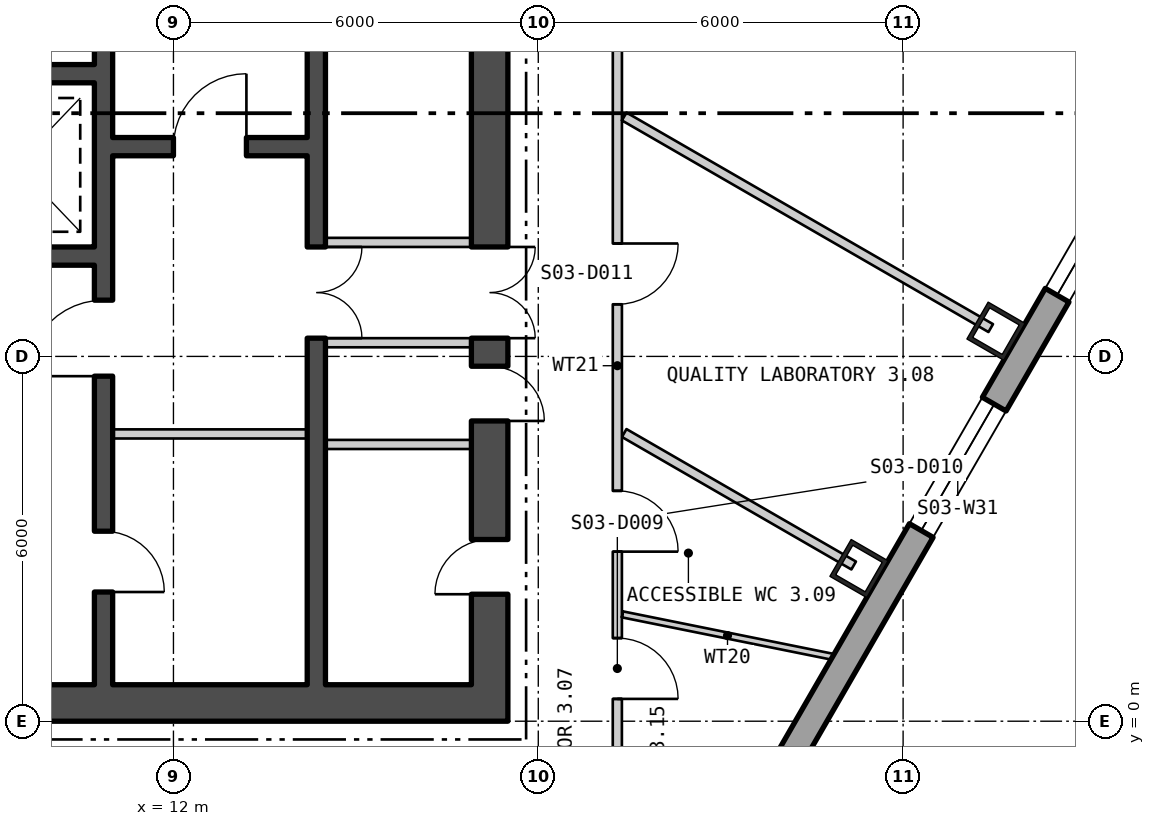
"""IFC4 building model, lengths in metres.
Left out: names, types, materials, properties, quantities, classifications, styles, units other than length and angle.
Written with IfcOpenShell. Run it as: python <this file> out.ifc"""

import sys

from ifc_helpers import new_model, si_unit, direction, frame, frame_2d, origin, origin_2d, place, context, subcontext, project, spatial, polyline, rectangle, hollow_rectangle, outline, extrude, element, fill, save


model = new_model("IFC4")
c1 = context("Model", 3, precision=1e-05, world=origin(), true_north=direction((0.0, 1.0)))
c2 = subcontext(c1, "Body", "Model", "MODEL_VIEW")
j1 = project(units=[si_unit("LENGTHUNIT", "METRE"), si_unit("PLANEANGLEUNIT", "RADIAN")], contexts=[c1])
p1 = place(None, origin())
s1 = spatial("IfcSite", under=j1, at=p1, CompositionType="ELEMENT")
p2 = place(p1, origin())
s2 = spatial("IfcBuilding", under=s1, at=p2, CompositionType="ELEMENT")
p3 = place(p2, frame((0.0, 0.0, 46.8)))
s3 = spatial("IfcBuildingStorey", under=s2, at=p3, CompositionType="ELEMENT", Elevation=46.8)
for number, where, z_axis, x_axis in (
    (1, (23.274, 2.511, 0.0), (0.0, 0.0, 1.0), (0.5, 0.866, 0.0)),
    (2, (25.527, 6.415, 0.0), (0.0, 0.0, 1.0), (0.5, 0.866, 0.0)),
):
    element("IfcColumn", number, at=place(p3, frame(where, z_axis=z_axis, x_axis=x_axis)), inside=s3, PredefinedType="COLUMN", context=c2, shape_type="SweptSolid", body=[
        extrude(hollow_rectangle(XDim=0.7, YDim=0.7, WallThickness=0.07, at=origin_2d()), origin(), (0.0, 0.0, 1.0), 4.5),
    ])
p4 = place(p3, frame((5.575, -29.294, -0.18), z_axis=(0.0, 0.0, 1.0), x_axis=(0.499999764979, 0.866025539474, 0.0)))
e3 = element("IfcWall", 3, at=p4, inside=s3, PredefinedType="SOLIDWALL", context=c2, shape_type="SweptSolid", body=[
    extrude(outline(polyline([(-0.13, -0.225), (45.87, -0.225), (45.61, 0.225), (0.13, 0.225), (-0.13, -0.225)])), origin(), (0.0, 0.0, 1.0), 4.28),
])
p5 = place(p4, frame((1.424, 0.0, 1.08)))
e4 = element("IfcOpeningElement", 4, at=p5, cuts=e3, PredefinedType="OPENING", context=c2, shape_type="SweptSolid", body=[
    extrude(rectangle(XDim=2.4, YDim=2.6, at=frame_2d((1.2, 1.3))), frame((0.0, 0.235, 0.0), z_axis=(0.0, -1.0, 0.0), x_axis=(1.0, 0.0, 0.0)), (0.0, 0.0, 1.0), 0.47),
])
p6 = place(p4, frame((5.893, 0.0, 1.08)))
e5 = element("IfcOpeningElement", 5, at=p6, cuts=e3, PredefinedType="OPENING", context=c2, shape_type="SweptSolid", body=[
    extrude(rectangle(XDim=2.4, YDim=2.6, at=frame_2d((1.2, 1.3))), frame((0.0, 0.235, 0.0), z_axis=(0.0, -1.0, 0.0), x_axis=(1.0, 0.0, 0.0)), (0.0, 0.0, 1.0), 0.47),
])
p7 = place(p4, frame((10.401, 0.0, 1.08)))
e6 = element("IfcOpeningElement", 6, at=p7, cuts=e3, PredefinedType="OPENING", context=c2, shape_type="SweptSolid", body=[
    extrude(rectangle(XDim=2.4, YDim=2.6, at=frame_2d((1.2, 1.3))), frame((0.0, 0.235, 0.0), z_axis=(0.0, -1.0, 0.0), x_axis=(1.0, 0.0, 0.0)), (0.0, 0.0, 1.0), 0.47),
])
p8 = place(p4, frame((14.909, 0.0, 1.08)))
e7 = element("IfcOpeningElement", 7, at=p8, cuts=e3, PredefinedType="OPENING", context=c2, shape_type="SweptSolid", body=[
    extrude(rectangle(XDim=2.4, YDim=2.6, at=frame_2d((1.2, 1.3))), frame((0.0, 0.235, 0.0), z_axis=(0.0, -1.0, 0.0), x_axis=(1.0, 0.0, 0.0)), (0.0, 0.0, 1.0), 0.47),
])
p9 = place(p4, frame((19.416, 0.0, 1.08)))
e8 = element("IfcOpeningElement", 8, at=p9, cuts=e3, PredefinedType="OPENING", context=c2, shape_type="SweptSolid", body=[
    extrude(rectangle(XDim=2.4, YDim=2.6, at=frame_2d((1.2, 1.3))), frame((0.0, 0.235, 0.0), z_axis=(0.0, -1.0, 0.0), x_axis=(1.0, 0.0, 0.0)), (0.0, 0.0, 1.0), 0.47),
])
p10 = place(p4, frame((23.924, 0.0, 1.08)))
e9 = element("IfcOpeningElement", 9, at=p10, cuts=e3, PredefinedType="OPENING", context=c2, shape_type="SweptSolid", body=[
    extrude(rectangle(XDim=2.4, YDim=2.6, at=frame_2d((1.2, 1.3))), frame((0.0, 0.235, 0.0), z_axis=(0.0, -1.0, 0.0), x_axis=(1.0, 0.0, 0.0)), (0.0, 0.0, 1.0), 0.47),
])
p11 = place(p4, frame((37.447, 0.0, 1.08)))
e10 = element("IfcOpeningElement", 10, at=p11, cuts=e3, PredefinedType="OPENING", context=c2, shape_type="SweptSolid", body=[
    extrude(rectangle(XDim=2.4, YDim=2.6, at=frame_2d((1.2, 1.3))), frame((0.0, 0.235, 0.0), z_axis=(0.0, -1.0, 0.0), x_axis=(1.0, 0.0, 0.0)), (0.0, 0.0, 1.0), 0.47),
])
p12 = place(p4, frame((41.916, 0.0, 1.08)))
e11 = element("IfcOpeningElement", 11, at=p12, cuts=e3, PredefinedType="OPENING", context=c2, shape_type="SweptSolid", body=[
    extrude(rectangle(XDim=2.4, YDim=2.6, at=frame_2d((1.2, 1.3))), frame((0.0, 0.235, 0.0), z_axis=(0.0, -1.0, 0.0), x_axis=(1.0, 0.0, 0.0)), (0.0, 0.0, 1.0), 0.47),
])
p13 = place(p3, frame((28.445, 10.319, -0.4), z_axis=(0.0, 0.0, 1.0), x_axis=(-0.500002192499, 0.866024137941, 0.0)))
e12 = element("IfcWall", 12, at=p13, inside=s3, PredefinedType="SOLIDWALL", context=c2, shape_type="SweptSolid", body=[
    extrude(outline(polyline([(-0.13, -0.225), (11.28, -0.225), (11.02, 0.225), (0.13, 0.225), (-0.13, -0.225)])), origin(), (0.0, 0.0, 1.0), 4.5),
])
p14 = place(p13, frame((1.218, 0.0, 1.3)))
e13 = element("IfcOpeningElement", 13, at=p14, cuts=e12, PredefinedType="OPENING", context=c2, shape_type="SweptSolid", body=[
    extrude(rectangle(XDim=1.8, YDim=2.6, at=frame_2d((0.9, 1.3))), frame((0.0, 0.235, 0.0), z_axis=(0.0, -1.0, 0.0), x_axis=(1.0, 0.0, 0.0)), (0.0, 0.0, 1.0), 0.47),
])
p15 = place(p13, frame((4.675, 0.0, 1.3)))
e14 = element("IfcOpeningElement", 14, at=p15, cuts=e12, PredefinedType="OPENING", context=c2, shape_type="SweptSolid", body=[
    extrude(rectangle(XDim=1.8, YDim=2.6, at=frame_2d((0.9, 1.3))), frame((0.0, 0.235, 0.0), z_axis=(0.0, -1.0, 0.0), x_axis=(1.0, 0.0, 0.0)), (0.0, 0.0, 1.0), 0.47),
])
p16 = place(p13, frame((8.132, 0.0, 1.3)))
e15 = element("IfcOpeningElement", 15, at=p16, cuts=e12, PredefinedType="OPENING", context=c2, shape_type="SweptSolid", body=[
    extrude(rectangle(XDim=1.8, YDim=2.6, at=frame_2d((0.9, 1.3))), frame((0.0, 0.235, 0.0), z_axis=(0.0, -1.0, 0.0), x_axis=(1.0, 0.0, 0.0)), (0.0, 0.0, 1.0), 0.47),
])
p17 = place(p3, frame((-17.5, 0.3, 0.0), z_axis=(0.0, 0.0, 1.0), x_axis=(1.0, 0.0, 0.0)))
e16 = element("IfcWall", 16, at=p17, inside=s3, PredefinedType="SHEAR", context=c2, shape_type="SweptSolid", body=[
    extrude(rectangle(XDim=35.0, YDim=0.6, at=frame_2d((17.5, 0.0))), origin(), (0.0, 0.0, 1.0), 4.3),
])
p18 = place(p17, frame((12.0, 0.0, 0.0)))
e17 = element("IfcOpeningElement", 17, at=p18, cuts=e16, PredefinedType="OPENING", context=c2, shape_type="SweptSolid", body=[
    extrude(rectangle(XDim=1.8, YDim=2.4, at=frame_2d((0.9, 1.2))), frame((0.0, 0.31, 0.0), z_axis=(0.0, -1.0, 0.0), x_axis=(1.0, 0.0, 0.0)), (0.0, 0.0, 1.0), 0.62),
])
p19 = place(p17, frame((22.0, 0.0, 0.0)))
e18 = element("IfcOpeningElement", 18, at=p19, cuts=e16, PredefinedType="OPENING", context=c2, shape_type="SweptSolid", body=[
    extrude(rectangle(XDim=1.8, YDim=2.4, at=frame_2d((0.9, 1.2))), frame((0.0, 0.31, 0.0), z_axis=(0.0, -1.0, 0.0), x_axis=(1.0, 0.0, 0.0)), (0.0, 0.0, 1.0), 0.62),
])
p20 = place(p3, frame((17.2, 0.6, 0.0), z_axis=(0.0, 0.0, 1.0), x_axis=(0.0, 1.0, 0.0)))
e19 = element("IfcWall", 19, at=p20, inside=s3, PredefinedType="SHEAR", context=c2, shape_type="SweptSolid", body=[
    extrude(rectangle(XDim=16.8, YDim=0.6, at=frame_2d((8.4, 0.0))), origin(), (0.0, 0.0, 1.0), 4.3),
])
p21 = place(p20, frame((5.7, 0.0, 0.0)))
e20 = element("IfcOpeningElement", 20, at=p21, cuts=e19, PredefinedType="OPENING", context=c2, shape_type="SweptSolid", body=[
    extrude(rectangle(XDim=1.5, YDim=2.1, at=frame_2d((0.75, 1.05))), frame((0.0, 0.31, 0.0), z_axis=(0.0, -1.0, 0.0), x_axis=(1.0, 0.0, 0.0)), (0.0, 0.0, 1.0), 0.62),
])
p22 = place(p20, frame((1.488, 0.0, 0.0)))
e21 = element("IfcOpeningElement", 21, at=p22, cuts=e19, PredefinedType="OPENING", context=c2, shape_type="SweptSolid", body=[
    extrude(rectangle(XDim=0.9, YDim=2.1, at=frame_2d((0.45, 1.05))), frame((0.0, 0.31, 0.0), z_axis=(0.0, -1.0, 0.0), x_axis=(1.0, 0.0, 0.0)), (0.0, 0.0, 1.0), 0.62),
])
p23 = place(p20, frame((4.338, 0.0, 0.0)))
e22 = element("IfcOpeningElement", 22, at=p23, cuts=e19, PredefinedType="OPENING", context=c2, shape_type="SweptSolid", body=[
    extrude(rectangle(XDim=0.9, YDim=2.1, at=frame_2d((0.45, 1.05))), frame((0.0, 0.31, 0.0), z_axis=(0.0, -1.0, 0.0), x_axis=(1.0, 0.0, 0.0)), (0.0, 0.0, 1.0), 0.62),
])
p24 = place(p20, frame((10.483, 0.0, 0.0)))
e23 = element("IfcOpeningElement", 23, at=p24, cuts=e19, PredefinedType="OPENING", context=c2, shape_type="SweptSolid", body=[
    extrude(rectangle(XDim=0.9, YDim=2.1, at=frame_2d((0.45, 1.05))), frame((0.0, 0.31, 0.0), z_axis=(0.0, -1.0, 0.0), x_axis=(1.0, 0.0, 0.0)), (0.0, 0.0, 1.0), 0.62),
])
p25 = place(p20, frame((15.233, 0.0, 0.0)))
e24 = element("IfcOpeningElement", 24, at=p25, cuts=e19, PredefinedType="OPENING", context=c2, shape_type="SweptSolid", body=[
    extrude(rectangle(XDim=1.0, YDim=2.1, at=frame_2d((0.5, 1.05))), frame((0.0, 0.31, 0.0), z_axis=(0.0, -1.0, 0.0), x_axis=(1.0, 0.0, 0.0)), (0.0, 0.0, 1.0), 0.62),
])
p26 = place(p3, frame((10.85, 0.6, 0.0), z_axis=(0.0, 0.0, 1.0), x_axis=(0.0, 1.0, 0.0)))
e25 = element("IfcWall", 25, at=p26, inside=s3, PredefinedType="SHEAR", context=c2, shape_type="SweptSolid", body=[
    extrude(rectangle(XDim=16.8, YDim=0.3, at=frame_2d((8.4, 0.0))), origin(), (0.0, 0.0, 1.0), 4.3),
])
p27 = place(p26, frame((5.075, 0.0, 0.0)))
e26 = element("IfcOpeningElement", 26, at=p27, cuts=e25, PredefinedType="OPENING", context=c2, shape_type="SweptSolid", body=[
    extrude(rectangle(XDim=1.25, YDim=2.1, at=frame_2d((0.625, 1.05))), frame((0.0, 0.16, 0.0), z_axis=(0.0, -1.0, 0.0), x_axis=(1.0, 0.0, 0.0)), (0.0, 0.0, 1.0), 0.32),
])
p28 = place(p26, frame((1.525, 0.0, 0.0)))
e27 = element("IfcOpeningElement", 27, at=p28, cuts=e25, PredefinedType="OPENING", context=c2, shape_type="SweptSolid", body=[
    extrude(rectangle(XDim=1.0, YDim=2.1, at=frame_2d((0.5, 1.05))), frame((0.0, 0.16, 0.0), z_axis=(0.0, -1.0, 0.0), x_axis=(1.0, 0.0, 0.0)), (0.0, 0.0, 1.0), 0.32),
])
p29 = place(p3, frame((14.35, 0.6, 0.0), z_axis=(0.0, 0.0, 1.0), x_axis=(0.0, 1.0, 0.0)))
e28 = element("IfcWall", 28, at=p29, inside=s3, PredefinedType="SHEAR", context=c2, shape_type="SweptSolid", body=[
    extrude(rectangle(XDim=16.8, YDim=0.3, at=frame_2d((8.4, 0.0))), origin(), (0.0, 0.0, 1.0), 4.3),
])
p30 = place(p29, frame((5.7, 0.0, 0.0)))
e29 = element("IfcOpeningElement", 29, at=p30, cuts=e28, PredefinedType="OPENING", context=c2, shape_type="SweptSolid", body=[
    extrude(rectangle(XDim=1.5, YDim=2.1, at=frame_2d((0.75, 1.05))), frame((0.0, 0.16, 0.0), z_axis=(0.0, -1.0, 0.0), x_axis=(1.0, 0.0, 0.0)), (0.0, 0.0, 1.0), 0.32),
])
p31 = place(p3, frame((11.0, 9.45, 0.0), z_axis=(0.0, 0.0, 1.0), x_axis=(1.0, 0.0, 0.0)))
e30 = element("IfcWall", 30, at=p31, inside=s3, PredefinedType="SHEAR", context=c2, shape_type="SweptSolid", body=[
    extrude(rectangle(XDim=3.2, YDim=0.3, at=frame_2d((1.6, 0.0))), origin(), (0.0, 0.0, 1.0), 4.3),
])
p32 = place(p31, frame((1.0, 0.0, 0.0)))
e31 = element("IfcOpeningElement", 31, at=p32, cuts=e30, PredefinedType="OPENING", context=c2, shape_type="SweptSolid", body=[
    extrude(rectangle(XDim=1.2, YDim=2.1, at=frame_2d((0.6, 1.05))), frame((0.0, 0.16, 0.0), z_axis=(0.0, -1.0, 0.0), x_axis=(1.0, 0.0, 0.0)), (0.0, 0.0, 1.0), 0.32),
])
for number, where, z_axis, x_axis in (
    (32, (2.6, 10.65, 0.0), (0.0, 0.0, 1.0), (1.0, 0.0, 0.0)),
    (33, (2.6, 7.65, 0.0), (0.0, 0.0, 1.0), (1.0, 0.0, 0.0)),
):
    element("IfcWall", number, at=place(p3, frame(where, z_axis=z_axis, x_axis=x_axis)), inside=s3, PredefinedType="SHEAR", context=c2, shape_type="SweptSolid", body=[
        extrude(rectangle(XDim=8.1, YDim=0.3, at=frame_2d((4.05, 0.0))), origin(), (0.0, 0.0, 1.0), 4.3),
    ])
p33 = place(p3, frame((11.0, 4.725, 0.0), z_axis=(0.0, 0.0, 1.0), x_axis=(1.0, 0.0, 0.0)))
e34 = element("IfcWall", 34, at=p33, inside=s3, PredefinedType="PARTITIONING", context=c2, shape_type="SweptSolid", body=[
    extrude(rectangle(XDim=3.2, YDim=0.15, at=frame_2d((1.6, 0.0))), origin(), (0.0, 0.0, 1.0), 4.3),
])
for number, where, z_axis, x_axis in (
    (35, (14.5, 6.225, 0.0), (0.0, 0.0, 1.0), (1.0, 0.0, 0.0)),
    (36, (14.5, 7.875, 0.0), (0.0, 0.0, 1.0), (1.0, 0.0, 0.0)),
    (37, (14.5, 4.552, 0.0), (0.0, 0.0, 1.0), (1.0, 0.0, 0.0)),
):
    element("IfcWall", number, at=place(p3, frame(where, z_axis=z_axis, x_axis=x_axis)), inside=s3, PredefinedType="PARTITIONING", context=c2, shape_type="SweptSolid", body=[
        extrude(rectangle(XDim=2.4, YDim=0.15, at=frame_2d((1.2, 0.0))), origin(), (0.0, 0.0, 1.0), 4.3),
    ])
p34 = place(p3, frame((19.3, -1.875, 0.0), z_axis=(0.0, 0.0, 1.0), x_axis=(6.4750065e-05, 0.999999997904, 0.0)))
e38 = element("IfcWall", 38, at=p34, inside=s3, PredefinedType="PARTITIONING", context=c2, shape_type="SweptSolid", body=[
    extrude(rectangle(XDim=15.444, YDim=0.15, at=frame_2d((7.722, 0.0))), origin(), (0.0, 0.0, 1.0), 4.3),
])
p35 = place(p34, frame((2.242, 0.0, 0.0)))
e39 = element("IfcOpeningElement", 39, at=p35, cuts=e38, PredefinedType="OPENING", context=c2, shape_type="SweptSolid", body=[
    extrude(rectangle(XDim=1.0, YDim=2.1, at=frame_2d((0.5, 1.05))), frame((0.0, 0.085, 0.0), z_axis=(0.0, -1.0, 0.0), x_axis=(1.0, 0.0, 0.0)), (0.0, 0.0, 1.0), 0.17),
])
p36 = place(p34, frame((4.664, 0.0, 0.0)))
e40 = element("IfcOpeningElement", 40, at=p36, cuts=e38, PredefinedType="OPENING", context=c2, shape_type="SweptSolid", body=[
    extrude(rectangle(XDim=1.0, YDim=2.1, at=frame_2d((0.5, 1.05))), frame((0.0, 0.085, 0.0), z_axis=(0.0, -1.0, 0.0), x_axis=(1.0, 0.0, 0.0)), (0.0, 0.0, 1.0), 0.17),
])
p37 = place(p34, frame((8.732, 0.0, 0.0)))
e41 = element("IfcOpeningElement", 41, at=p37, cuts=e38, PredefinedType="OPENING", context=c2, shape_type="SweptSolid", body=[
    extrude(rectangle(XDim=1.0, YDim=2.1, at=frame_2d((0.5, 1.05))), frame((0.0, 0.085, 0.0), z_axis=(0.0, -1.0, 0.0), x_axis=(1.0, 0.0, 0.0)), (0.0, 0.0, 1.0), 0.17),
])
p38 = place(p34, frame((13.102, 0.0, 0.0)))
e42 = element("IfcOpeningElement", 42, at=p38, cuts=e38, PredefinedType="OPENING", context=c2, shape_type="SweptSolid", body=[
    extrude(rectangle(XDim=1.0, YDim=2.1, at=frame_2d((0.5, 1.05))), frame((0.0, 0.085, 0.0), z_axis=(0.0, -1.0, 0.0), x_axis=(1.0, 0.0, 0.0)), (0.0, 0.0, 1.0), 0.17),
])
p39 = place(p3, frame((19.385, 1.757, 0.0), z_axis=(0.0, 0.0, 1.0), x_axis=(0.980240840704, -0.197807720316, 0.0)))
e43 = element("IfcWall", 43, at=p39, inside=s3, PredefinedType="PARTITIONING", context=c2, shape_type="SweptSolid", body=[
    extrude(rectangle(XDim=3.524, YDim=0.1, at=frame_2d((1.762, 0.0))), origin(), (0.0, 0.0, 1.0), 4.3),
])
p40 = place(p3, frame((19.413, 4.74, 0.0), z_axis=(0.0, 0.0, 1.0), x_axis=(0.866017446268, -0.50001378257, 0.0)))
e44 = element("IfcWall", 44, at=p40, inside=s3, PredefinedType="PARTITIONING", context=c2, shape_type="SweptSolid", body=[
    extrude(rectangle(XDim=4.358, YDim=0.15, at=frame_2d((2.179, 0.0))), origin(), (0.0, 0.0, 1.0), 4.3),
])
p41 = place(p3, frame((19.413, 9.946, 0.0), z_axis=(0.0, 0.0, 1.0), x_axis=(0.866042039906, -0.499971184285, 0.0)))
e45 = element("IfcWall", 45, at=p41, inside=s3, PredefinedType="PARTITIONING", context=c2, shape_type="SweptSolid", body=[
    extrude(rectangle(XDim=6.96, YDim=0.15, at=frame_2d((3.48, 0.0))), origin(), (0.0, 0.0, 1.0), 4.3),
])
p42 = place(p11, origin())
e46 = element("IfcWindow", 46, at=p42, inside=s3, PartitioningType="SINGLE_PANEL", PredefinedType="WINDOW", context=c2, shape_type="SweptSolid", body=[
    extrude(rectangle(XDim=2.4, YDim=2.6, at=frame_2d((1.2, 1.3))), frame((0.0, 0.105, 0.0), z_axis=(0.0, -1.0, 0.0), x_axis=(1.0, 0.0, 0.0)), (0.0, 0.0, 1.0), 0.06),
])
fill(e10, e46)
p43 = place(p12, origin())
e47 = element("IfcWindow", 47, at=p43, inside=s3, PartitioningType="SINGLE_PANEL", PredefinedType="WINDOW", context=c2, shape_type="SweptSolid", body=[
    extrude(rectangle(XDim=2.4, YDim=2.6, at=frame_2d((1.2, 1.3))), frame((0.0, 0.105, 0.0), z_axis=(0.0, -1.0, 0.0), x_axis=(1.0, 0.0, 0.0)), (0.0, 0.0, 1.0), 0.06),
])
fill(e11, e47)
p44 = place(p32, origin())
e48 = element("IfcDoor", 48, at=p44, inside=s3, OperationType="SINGLE_SWING_LEFT", PredefinedType="DOOR", context=c2, shape_type="SweptSolid", body=[
    extrude(rectangle(XDim=1.2, YDim=2.1, at=frame_2d((0.6, 1.05))), frame((0.0, 0.025, 0.0), z_axis=(0.0, -1.0, 0.0), x_axis=(1.0, 0.0, 0.0)), (0.0, 0.0, 1.0), 0.05),
])
fill(e31, e48)
p45 = place(p27, origin())
e49 = element("IfcDoor", 49, at=p45, inside=s3, OperationType="SINGLE_SWING_RIGHT", PredefinedType="DOOR", context=c2, shape_type="SweptSolid", body=[
    extrude(rectangle(XDim=1.25, YDim=2.1, at=frame_2d((0.625, 1.05))), frame((0.0, 0.025, 0.0), z_axis=(0.0, -1.0, 0.0), x_axis=(1.0, 0.0, 0.0)), (0.0, 0.0, 1.0), 0.05),
])
fill(e26, e49)
p46 = place(p28, origin())
e50 = element("IfcDoor", 50, at=p46, inside=s3, OperationType="SINGLE_SWING_LEFT", PredefinedType="DOOR", context=c2, shape_type="SweptSolid", body=[
    extrude(rectangle(XDim=1.0, YDim=2.1, at=frame_2d((0.5, 1.05))), frame((0.0, 0.025, 0.0), z_axis=(0.0, -1.0, 0.0), x_axis=(1.0, 0.0, 0.0)), (0.0, 0.0, 1.0), 0.05),
])
fill(e27, e50)
p47 = place(p30, origin())
e51 = element("IfcDoor", 51, at=p47, inside=s3, OperationType="DOUBLE_DOOR_SINGLE_SWING", PredefinedType="DOOR", context=c2, shape_type="SweptSolid", body=[
    extrude(rectangle(XDim=1.5, YDim=2.1, at=frame_2d((0.75, 1.05))), frame((0.0, 0.025, 0.0), z_axis=(0.0, -1.0, 0.0), x_axis=(1.0, 0.0, 0.0)), (0.0, 0.0, 1.0), 0.05),
])
fill(e29, e51)
p48 = place(p21, origin())
e52 = element("IfcDoor", 52, at=p48, inside=s3, OperationType="DOUBLE_DOOR_SINGLE_SWING", PredefinedType="DOOR", context=c2, shape_type="SweptSolid", body=[
    extrude(rectangle(XDim=1.5, YDim=2.1, at=frame_2d((0.75, 1.05))), frame((0.0, 0.025, 0.0), z_axis=(0.0, -1.0, 0.0), x_axis=(1.0, 0.0, 0.0)), (0.0, 0.0, 1.0), 0.05),
])
fill(e20, e52)
p49 = place(p22, origin())
e53 = element("IfcDoor", 53, at=p49, inside=s3, OperationType="SINGLE_SWING_RIGHT", PredefinedType="DOOR", context=c2, shape_type="SweptSolid", body=[
    extrude(rectangle(XDim=0.9, YDim=2.1, at=frame_2d((0.45, 1.05))), frame((0.0, 0.025, 0.0), z_axis=(0.0, -1.0, 0.0), x_axis=(1.0, 0.0, 0.0)), (0.0, 0.0, 1.0), 0.05),
])
fill(e21, e53)
p50 = place(p23, origin())
e54 = element("IfcDoor", 54, at=p50, inside=s3, OperationType="SINGLE_SWING_LEFT", PredefinedType="DOOR", context=c2, shape_type="SweptSolid", body=[
    extrude(rectangle(XDim=0.9, YDim=2.1, at=frame_2d((0.45, 1.05))), frame((0.0, 0.025, 0.0), z_axis=(0.0, -1.0, 0.0), x_axis=(1.0, 0.0, 0.0)), (0.0, 0.0, 1.0), 0.05),
])
fill(e22, e54)
p51 = place(p35, origin())
e55 = element("IfcDoor", 55, at=p51, inside=s3, OperationType="SINGLE_SWING_LEFT", PredefinedType="DOOR", context=c2, shape_type="SweptSolid", body=[
    extrude(rectangle(XDim=1.0, YDim=2.1, at=frame_2d((0.5, 1.05))), frame((0.0, 0.025, 0.0), z_axis=(0.0, -1.0, 0.0), x_axis=(1.0, 0.0, 0.0)), (0.0, 0.0, 1.0), 0.05),
])
fill(e39, e55)
p52 = place(p36, origin())
e56 = element("IfcDoor", 56, at=p52, inside=s3, OperationType="SINGLE_SWING_LEFT", PredefinedType="DOOR", context=c2, shape_type="SweptSolid", body=[
    extrude(rectangle(XDim=1.0, YDim=2.1, at=frame_2d((0.5, 1.05))), frame((0.0, 0.025, 0.0), z_axis=(0.0, -1.0, 0.0), x_axis=(1.0, 0.0, 0.0)), (0.0, 0.0, 1.0), 0.05),
])
fill(e40, e56)
p53 = place(p37, origin())
e57 = element("IfcDoor", 57, at=p53, inside=s3, OperationType="SINGLE_SWING_RIGHT", PredefinedType="DOOR", context=c2, shape_type="SweptSolid", body=[
    extrude(rectangle(XDim=1.0, YDim=2.1, at=frame_2d((0.5, 1.05))), frame((0.0, 0.025, 0.0), z_axis=(0.0, -1.0, 0.0), x_axis=(1.0, 0.0, 0.0)), (0.0, 0.0, 1.0), 0.05),
])
fill(e41, e57)
save(model, sys.argv[1])
